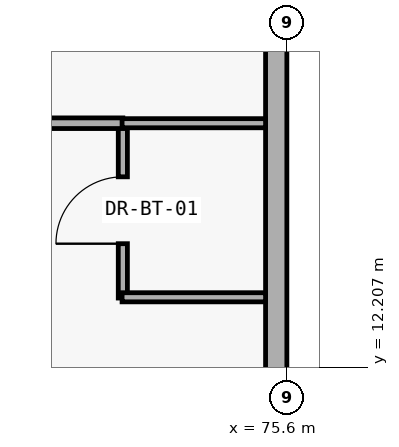
"""IFC4 building model, lengths in metres.
Left out: names, types, materials, properties, quantities, classifications, styles, units other than length and angle.
Written with IfcOpenShell. Run it as: python <this file> out.ifc"""

import sys

from ifc_helpers import new_model, si_unit, direction, frame, frame_2d, origin, place, context, subcontext, project, spatial, rectangle, extrude, element, fill, save


model = new_model("IFC4")
c1 = context("Model", 3, precision=1e-05, world=origin(), true_north=direction((0.0, 1.0)))
c2 = subcontext(c1, "Body", "Model", "MODEL_VIEW")
j1 = project(units=[si_unit("LENGTHUNIT", "METRE"), si_unit("PLANEANGLEUNIT", "RADIAN")], contexts=[c1])
p1 = place(None, origin())
s1 = spatial("IfcSite", under=j1, at=p1, CompositionType="ELEMENT")
p2 = place(p1, origin())
s2 = spatial("IfcBuilding", under=s1, at=p2, CompositionType="ELEMENT")
p3 = place(p2, frame((0.0, 0.0, 26.4)))
s3 = spatial("IfcBuildingStorey", under=s2, at=p3, CompositionType="ELEMENT", Elevation=26.4)
p4 = place(p3, frame((75.46, 34.0, 0.0), z_axis=(0.0, 0.0, 1.0), x_axis=(0.0, -1.0, 0.0)))
e1 = element("IfcWall", 1, at=p4, inside=s3, PredefinedType="SOLIDWALL", context=c2, shape_type="SweptSolid", body=[
    extrude(rectangle(XDim=25.2, YDim=0.28, at=frame_2d((12.6, 0.0))), origin(), (0.0, 0.0, 1.0), 3.32),
])
p5 = place(p4, frame((21.9, 0.0, 0.95)))
e2 = element("IfcOpeningElement", 2, at=p5, cuts=e1, PredefinedType="OPENING", context=c2, shape_type="SweptSolid", body=[
    extrude(rectangle(XDim=1.6, YDim=1.6, at=frame_2d((0.8, 0.8))), frame((0.0, 0.15, 0.0), z_axis=(0.0, -1.0, 0.0), x_axis=(1.0, 0.0, 0.0)), (0.0, 0.0, 1.0), 0.3),
])
p6 = place(p3, frame((73.442, 13.12, 0.0), z_axis=(0.0, 0.0, 1.0), x_axis=(0.0, 1.0, 0.0)))
e3 = element("IfcWall", 3, at=p6, inside=s3, PredefinedType="PARTITIONING", context=c2, shape_type="SweptSolid", body=[
    extrude(rectangle(XDim=2.31, YDim=0.12, at=frame_2d((1.155, 0.0))), origin(), (0.0, 0.0, 1.0), 2.48),
])
p7 = place(p6, frame((0.715, 0.0, 0.0)))
e4 = element("IfcOpeningElement", 4, at=p7, cuts=e3, PredefinedType="OPENING", context=c2, shape_type="SweptSolid", body=[
    extrude(rectangle(XDim=0.88, YDim=2.15, at=frame_2d((0.44, 1.075))), frame((0.0, 0.07, 0.0), z_axis=(0.0, -1.0, 0.0), x_axis=(1.0, 0.0, 0.0)), (0.0, 0.0, 1.0), 0.14),
])
p8 = place(p3, frame((70.381, 15.42, 0.0), z_axis=(0.0, 0.0, 1.0), x_axis=(1.0, 0.0, 0.0)))
e5 = element("IfcWall", 5, at=p8, inside=s3, PredefinedType="PARTITIONING", context=c2, shape_type="SweptSolid", body=[
    extrude(rectangle(XDim=3.061, YDim=0.14, at=frame_2d((1.53, 0.0))), origin(), (0.0, 0.0, 1.0), 2.48),
])
p9 = place(p8, frame((0.855, 0.0, 0.0)))
e6 = element("IfcOpeningElement", 6, at=p9, cuts=e5, PredefinedType="OPENING", context=c2, shape_type="SweptSolid", body=[
    extrude(rectangle(XDim=0.96, YDim=2.25, at=frame_2d((0.48, 1.125))), frame((0.0, 0.08, 0.0), z_axis=(0.0, -1.0, 0.0), x_axis=(1.0, 0.0, 0.0)), (0.0, 0.0, 1.0), 0.16),
])
for number, where, z_axis, x_axis in (
    (7, (73.432, 13.13, 0.0), (0.0, 0.0, 1.0), (1.0, 0.0, 0.0)),
    (8, (73.432, 15.42, 0.0), (0.0, 0.0, 1.0), (1.0, 0.0, 0.0)),
):
    element("IfcWall", number, at=place(p3, frame(where, z_axis=z_axis, x_axis=x_axis)), inside=s3, PredefinedType="PARTITIONING", context=c2, shape_type="SweptSolid", body=[
        extrude(rectangle(XDim=1.888, YDim=0.12, at=frame_2d((0.944, 0.0))), origin(), (0.0, 0.0, 1.0), 2.48),
    ])
p10 = place(p7, origin())
e9 = element("IfcDoor", 9, at=p10, inside=s3, OperationType="SINGLE_SWING_LEFT", PredefinedType="DOOR", context=c2, shape_type="SweptSolid", body=[
    extrude(rectangle(XDim=0.88, YDim=2.15, at=frame_2d((0.44, 1.075))), frame((0.0, 0.025, 0.0), z_axis=(0.0, -1.0, 0.0), x_axis=(1.0, 0.0, 0.0)), (0.0, 0.0, 1.0), 0.05),
])
fill(e4, e9)
save(model, sys.argv[1])
